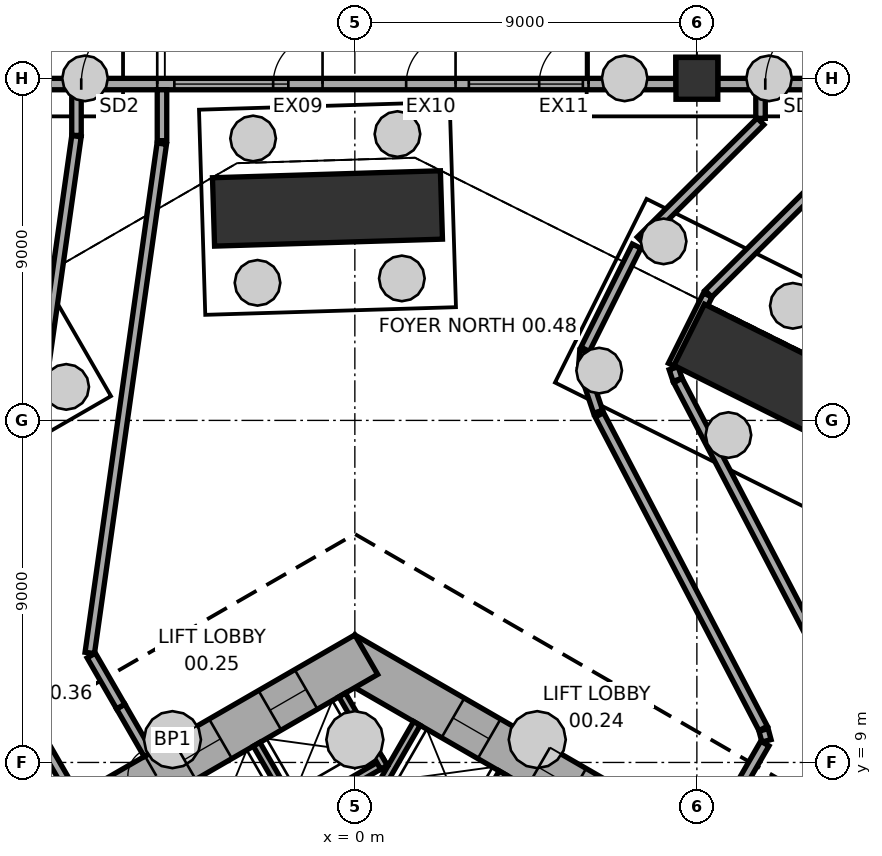
"""IFC4 building model, lengths in metres.
Left out: names, types, materials, properties, quantities, classifications, styles, units other than length and angle.
Written with IfcOpenShell. Run it as: python <this file> out.ifc"""

import sys

from ifc_helpers import new_model, si_unit, direction, frame, frame_2d, origin, origin_2d, place, context, subcontext, project, spatial, rectangle, extrude, element, fill, save


model = new_model("IFC4")
c1 = context("Model", 3, precision=1e-05, world=origin(), true_north=direction((0.0, 1.0)))
c2 = subcontext(c1, "Body", "Model", "MODEL_VIEW")
j1 = project(units=[si_unit("LENGTHUNIT", "METRE"), si_unit("PLANEANGLEUNIT", "RADIAN")], contexts=[c1])
p1 = place(None, origin())
s1 = spatial("IfcSite", under=j1, at=p1, CompositionType="ELEMENT")
p2 = place(p1, origin())
s2 = spatial("IfcBuilding", under=s1, at=p2, CompositionType="ELEMENT")
p3 = place(p2, origin())
s3 = spatial("IfcBuildingStorey", under=s2, at=p3, CompositionType="ELEMENT", Elevation=0.0)
p4 = place(p3, frame((10.677, 19.315, -0.3), z_axis=(0.0, 0.0, 1.0), x_axis=(-0.894935140363, 0.446196251154, 0.0)))
e1 = element("IfcColumn", 1, at=p4, inside=s3, PredefinedType="COLUMN", context=c2, shape_type="SweptSolid", body=[
    extrude(rectangle(XDim=4.2, YDim=1.8, at=origin_2d()), origin(), (0.0, 0.0, 1.0), 7.8),
])
p5 = place(p3, frame((-0.72, 23.577, -0.3), z_axis=(0.0, 0.0, 1.0), x_axis=(-0.999533644135, -0.030536768695, 0.0)))
e2 = element("IfcColumn", 2, at=p5, inside=s3, PredefinedType="COLUMN", context=c2, shape_type="SweptSolid", body=[
    extrude(rectangle(XDim=6.0, YDim=1.8, at=origin_2d()), origin(), (0.0, 0.0, 1.0), 7.8),
])
p6 = place(p3, frame((9.0, 27.0, -0.3), z_axis=(0.0, 0.0, 1.0), x_axis=(1.0, 0.0, 0.0)))
e3 = element("IfcColumn", 3, at=p6, inside=s3, PredefinedType="COLUMN", context=c2, shape_type="SweptSolid", body=[
    extrude(rectangle(XDim=1.1, YDim=1.1, at=origin_2d()), origin(), (0.0, 0.0, 1.0), 7.8),
])
p7 = place(p3, frame((10.4, 5.658, -0.3), z_axis=(0.0, 0.0, 1.0), x_axis=(-0.866021384402, 0.500006961711, 0.0)))
e4 = element("IfcWall", 4, at=p7, inside=s3, PredefinedType="SHEAR", context=c2, shape_type="SweptSolid", body=[
    extrude(rectangle(XDim=12.355, YDim=1.2, at=frame_2d((6.178, 0.0))), origin(), (0.0, 0.0, 1.0), 7.8),
])
p8 = place(p7, frame((2.728, 0.0, 0.3)))
e5 = element("IfcOpeningElement", 5, at=p8, cuts=e4, PredefinedType="OPENING", context=c2, shape_type="SweptSolid", body=[
    extrude(rectangle(XDim=1.1, YDim=2.1, at=frame_2d((0.55, 1.05))), frame((0.0, 0.61, 0.0), z_axis=(0.0, -1.0, 0.0), x_axis=(1.0, 0.0, 0.0)), (0.0, 0.0, 1.0), 1.22),
])
p9 = place(p7, frame((5.328, 0.0, 0.3)))
e6 = element("IfcOpeningElement", 6, at=p9, cuts=e4, PredefinedType="OPENING", context=c2, shape_type="SweptSolid", body=[
    extrude(rectangle(XDim=1.1, YDim=2.1, at=frame_2d((0.55, 1.05))), frame((0.0, 0.61, 0.0), z_axis=(0.0, -1.0, 0.0), x_axis=(1.0, 0.0, 0.0)), (0.0, 0.0, 1.0), 1.22),
])
p10 = place(p7, frame((7.928, 0.0, 0.3)))
e7 = element("IfcOpeningElement", 7, at=p10, cuts=e4, PredefinedType="OPENING", context=c2, shape_type="SweptSolid", body=[
    extrude(rectangle(XDim=1.1, YDim=2.1, at=frame_2d((0.55, 1.05))), frame((0.0, 0.61, 0.0), z_axis=(0.0, -1.0, 0.0), x_axis=(1.0, 0.0, 0.0)), (0.0, 0.0, 1.0), 1.22),
])
p11 = place(p3, frame((0.3, 11.836, -0.3), z_axis=(0.0, 0.0, 1.0), x_axis=(-0.866021384402, -0.500006961711, 0.0)))
e8 = element("IfcWall", 8, at=p11, inside=s3, PredefinedType="SHEAR", context=c2, shape_type="SweptSolid", body=[
    extrude(rectangle(XDim=12.355, YDim=1.2, at=frame_2d((6.178, 0.0))), origin(), (0.0, 0.0, 1.0), 7.8),
])
p12 = place(p11, frame((6.378, 0.0, 0.3)))
e9 = element("IfcOpeningElement", 9, at=p12, cuts=e8, PredefinedType="OPENING", context=c2, shape_type="SweptSolid", body=[
    extrude(rectangle(XDim=1.5, YDim=2.1, at=frame_2d((0.75, 1.05))), frame((0.0, 0.61, 0.0), z_axis=(0.0, -1.0, 0.0), x_axis=(1.0, 0.0, 0.0)), (0.0, 0.0, 1.0), 1.22),
])
p13 = place(p11, frame((1.828, 0.0, 0.3)))
e10 = element("IfcOpeningElement", 10, at=p13, cuts=e8, PredefinedType="OPENING", context=c2, shape_type="SweptSolid", body=[
    extrude(rectangle(XDim=1.1, YDim=2.1, at=frame_2d((0.55, 1.05))), frame((0.0, 0.61, 0.0), z_axis=(0.0, -1.0, 0.0), x_axis=(1.0, 0.0, 0.0)), (0.0, 0.0, 1.0), 1.22),
])
p14 = place(p11, frame((4.428, 0.0, 0.3)))
e11 = element("IfcOpeningElement", 11, at=p14, cuts=e8, PredefinedType="OPENING", context=c2, shape_type="SweptSolid", body=[
    extrude(rectangle(XDim=1.1, YDim=2.1, at=frame_2d((0.55, 1.05))), frame((0.0, 0.61, 0.0), z_axis=(0.0, -1.0, 0.0), x_axis=(1.0, 0.0, 0.0)), (0.0, 0.0, 1.0), 1.22),
])
p15 = place(p3, frame((26.45, 26.85, 0.0), z_axis=(0.0, 0.0, 1.0), x_axis=(-1.0, 0.0, 0.0)))
e12 = element("IfcWall", 12, at=p15, inside=s3, PredefinedType="STANDARD", context=c2, shape_type="SweptSolid", body=[
    extrude(rectangle(XDim=16.9, YDim=0.3, at=frame_2d((8.45, 0.0))), origin(), (0.0, 0.0, 1.0), 6.0),
])
p16 = place(p15, frame((2.95, 0.0, 4.7)))
e13 = element("IfcOpeningElement", 13, at=p16, cuts=e12, PredefinedType="OPENING", context=c2, shape_type="SweptSolid", body=[
    extrude(rectangle(XDim=3.0, YDim=1.3, at=frame_2d((1.5, 0.65))), frame((0.0, 0.16, 0.0), z_axis=(0.0, -1.0, 0.0), x_axis=(1.0, 0.0, 0.0)), (0.0, 0.0, 1.0), 0.32),
])
p17 = place(p15, frame((9.95, 0.0, 4.7)))
e14 = element("IfcOpeningElement", 14, at=p17, cuts=e12, PredefinedType="OPENING", context=c2, shape_type="SweptSolid", body=[
    extrude(rectangle(XDim=3.0, YDim=1.3, at=frame_2d((1.5, 0.65))), frame((0.0, 0.16, 0.0), z_axis=(0.0, -1.0, 0.0), x_axis=(1.0, 0.0, 0.0)), (0.0, 0.0, 1.0), 0.32),
])
p18 = place(p15, frame((11.0, 0.0, 0.0)))
e15 = element("IfcOpeningElement", 15, at=p18, cuts=e12, PredefinedType="OPENING", context=c2, shape_type="SweptSolid", body=[
    extrude(rectangle(XDim=2.1, YDim=2.4, at=frame_2d((1.05, 1.2))), frame((0.0, 0.16, 0.0), z_axis=(0.0, -1.0, 0.0), x_axis=(1.0, 0.0, 0.0)), (0.0, 0.0, 1.0), 0.32),
])
p19 = place(p15, frame((13.65, 0.0, 0.0)))
e16 = element("IfcOpeningElement", 16, at=p19, cuts=e12, PredefinedType="OPENING", context=c2, shape_type="SweptSolid", body=[
    extrude(rectangle(XDim=2.0, YDim=2.4, at=frame_2d((1.0, 1.2))), frame((0.0, 0.16, 0.0), z_axis=(0.0, -1.0, 0.0), x_axis=(1.0, 0.0, 0.0)), (0.0, 0.0, 1.0), 0.32),
])
p20 = place(p3, frame((8.45, 26.85, 0.0), z_axis=(0.0, 0.0, 1.0), x_axis=(-1.0, 0.0, 0.0)))
e17 = element("IfcWall", 17, at=p20, inside=s3, PredefinedType="STANDARD", context=c2, shape_type="SweptSolid", body=[
    extrude(rectangle(XDim=16.9, YDim=0.3, at=frame_2d((8.45, 0.0))), origin(), (0.0, 0.0, 1.0), 6.0),
])
p21 = place(p20, frame((2.45, 0.0, 4.7)))
e18 = element("IfcOpeningElement", 18, at=p21, cuts=e17, PredefinedType="OPENING", context=c2, shape_type="SweptSolid", body=[
    extrude(rectangle(XDim=3.0, YDim=1.3, at=frame_2d((1.5, 0.65))), frame((0.0, 0.16, 0.0), z_axis=(0.0, -1.0, 0.0), x_axis=(1.0, 0.0, 0.0)), (0.0, 0.0, 1.0), 0.32),
])
p22 = place(p20, frame((10.2, 0.0, 4.7)))
e19 = element("IfcOpeningElement", 19, at=p22, cuts=e17, PredefinedType="OPENING", context=c2, shape_type="SweptSolid", body=[
    extrude(rectangle(XDim=3.0, YDim=1.3, at=frame_2d((1.5, 0.65))), frame((0.0, 0.16, 0.0), z_axis=(0.0, -1.0, 0.0), x_axis=(1.0, 0.0, 0.0)), (0.0, 0.0, 1.0), 0.32),
])
p23 = place(p20, frame((9.3, 0.0, 0.0)))
e20 = element("IfcOpeningElement", 20, at=p23, cuts=e17, PredefinedType="OPENING", context=c2, shape_type="SweptSolid", body=[
    extrude(rectangle(XDim=1.3, YDim=2.4, at=frame_2d((0.65, 1.2))), frame((0.0, 0.16, 0.0), z_axis=(0.0, -1.0, 0.0), x_axis=(1.0, 0.0, 0.0)), (0.0, 0.0, 1.0), 0.32),
])
p24 = place(p20, frame((5.8, 0.0, 0.0)))
e21 = element("IfcOpeningElement", 21, at=p24, cuts=e17, PredefinedType="OPENING", context=c2, shape_type="SweptSolid", body=[
    extrude(rectangle(XDim=1.3, YDim=2.4, at=frame_2d((0.65, 1.2))), frame((0.0, 0.16, 0.0), z_axis=(0.0, -1.0, 0.0), x_axis=(1.0, 0.0, 0.0)), (0.0, 0.0, 1.0), 0.32),
])
p25 = place(p20, frame((2.3, 0.0, 0.0)))
e22 = element("IfcOpeningElement", 22, at=p25, cuts=e17, PredefinedType="OPENING", context=c2, shape_type="SweptSolid", body=[
    extrude(rectangle(XDim=1.3, YDim=2.4, at=frame_2d((0.65, 1.2))), frame((0.0, 0.16, 0.0), z_axis=(0.0, -1.0, 0.0), x_axis=(1.0, 0.0, 0.0)), (0.0, 0.0, 1.0), 0.32),
])
p26 = place(p20, frame((13.65, 0.0, 0.0)))
e23 = element("IfcOpeningElement", 23, at=p26, cuts=e17, PredefinedType="OPENING", context=c2, shape_type="SweptSolid", body=[
    extrude(rectangle(XDim=2.0, YDim=2.4, at=frame_2d((1.0, 1.2))), frame((0.0, 0.16, 0.0), z_axis=(0.0, -1.0, 0.0), x_axis=(1.0, 0.0, 0.0)), (0.0, 0.0, 1.0), 0.32),
])
for number, where, z_axis, x_axis in (
    (24, (2.784, 6.822, 0.0), (0.0, 0.0, 1.0), (0.5, 0.866, 0.0)),
    (25, (0.532, 8.122, 0.0), (0.0, 0.0, 1.0), (0.5, 0.866, 0.0)),
):
    element("IfcWall", number, at=place(p3, frame(where, z_axis=z_axis, x_axis=x_axis)), inside=s3, PredefinedType="PARTITIONING", context=c2, shape_type="SweptSolid", body=[
        extrude(rectangle(XDim=2.2, YDim=0.2, at=frame_2d((1.1, 0.0))), origin(), (0.0, 0.0, 1.0), 7.2),
    ])
p27 = place(p3, frame((0.803, 9.009, 0.0), z_axis=(0.0, 0.0, 1.0), x_axis=(-0.866028230842, -0.499995103361, 0.0)))
e26 = element("IfcWall", 26, at=p27, inside=s3, PredefinedType="PARTITIONING", context=c2, shape_type="SweptSolid", body=[
    extrude(rectangle(XDim=5.4, YDim=0.2, at=frame_2d((2.7, 0.0))), origin(), (0.0, 0.0, 1.0), 7.2),
])
p28 = place(p3, frame((0.767, 8.872, 0.0), z_axis=(0.0, 0.0, 1.0), x_axis=(-0.499994660107, 0.866028486751, 0.0)))
e27 = element("IfcWall", 27, at=p28, inside=s3, PredefinedType="PARTITIONING", context=c2, shape_type="SweptSolid", body=[
    extrude(rectangle(XDim=2.2, YDim=0.2, at=frame_2d((1.1, 0.0))), origin(), (0.0, 0.0, 1.0), 7.2),
])
p29 = place(p3, frame((-1.485, 7.572, 0.0), z_axis=(0.0, 0.0, 1.0), x_axis=(-0.50002983664, 0.866008176907, 0.0)))
e28 = element("IfcWall", 28, at=p29, inside=s3, PredefinedType="PARTITIONING", context=c2, shape_type="SweptSolid", body=[
    extrude(rectangle(XDim=2.2, YDim=0.2, at=frame_2d((1.1, 0.0))), origin(), (0.0, 0.0, 1.0), 7.2),
])
p30 = place(p3, frame((9.329, 6.969, 0.0), z_axis=(0.0, 0.0, 1.0), x_axis=(0.49998782916, 0.866032430508, 0.0)))
e29 = element("IfcWall", 29, at=p30, inside=s3, PredefinedType="SOLIDWALL", context=c2, shape_type="SweptSolid", body=[
    extrude(rectangle(XDim=2.92, YDim=0.25, at=frame_2d((1.46, 0.0))), origin(), (0.0, 0.0, 1.0), 7.2),
])
p31 = place(p3, frame((-7.385, 8.092, 0.0), z_axis=(0.0, 0.0, 1.0), x_axis=(-0.500011578892, 0.866018718605, 0.0)))
e30 = element("IfcWall", 30, at=p31, inside=s3, PredefinedType="SOLIDWALL", context=c2, shape_type="SweptSolid", body=[
    extrude(rectangle(XDim=3.655, YDim=0.25, at=frame_2d((1.827, 0.0))), origin(), (0.0, 0.0, 1.0), 7.2),
])
p32 = place(p3, frame((10.755, 9.856, 0.0), z_axis=(0.0, 0.0, 1.0), x_axis=(0.258174364225, -0.966098337467, 0.0)))
e31 = element("IfcWall", 31, at=p32, inside=s3, PredefinedType="SOLIDWALL", context=c2, shape_type="SweptSolid", body=[
    extrude(rectangle(XDim=0.297, YDim=0.25, at=frame_2d((0.148, 0.0))), origin(), (0.0, 0.0, 1.0), 7.2),
])
p33 = place(p3, frame((10.745, 9.895, 0.0), z_axis=(0.0, 0.0, 1.0), x_axis=(-0.463048194797, 0.886333102899, 0.0)))
e32 = element("IfcWall", 32, at=p33, inside=s3, PredefinedType="SOLIDWALL", context=c2, shape_type="SweptSolid", body=[
    extrude(rectangle(XDim=9.308, YDim=0.25, at=frame_2d((4.654, 0.0))), origin(), (0.0, 0.0, 1.0), 7.2),
])
p34 = place(p3, frame((-6.162, 10.472, 0.0), z_axis=(0.0, 0.0, 1.0), x_axis=(0.500159754115, -0.865933150054, 0.0)))
e33 = element("IfcWall", 33, at=p34, inside=s3, PredefinedType="SOLIDWALL", context=c2, shape_type="SweptSolid", body=[
    extrude(rectangle(XDim=1.45, YDim=0.25, at=frame_2d((0.725, 0.0))), origin(), (0.0, 0.0, 1.0), 7.2),
])
p35 = place(p3, frame((-6.162, 10.472, 0.0), z_axis=(0.0, 0.0, 1.0), x_axis=(-0.499899694197, 0.866083307622, 0.0)))
e34 = element("IfcWall", 34, at=p35, inside=s3, PredefinedType="SOLIDWALL", context=c2, shape_type="SweptSolid", body=[
    extrude(rectangle(XDim=1.55, YDim=0.25, at=frame_2d((0.775, 0.0))), origin(), (0.0, 0.0, 1.0), 7.2),
])
p36 = place(p3, frame((-9.278, 11.666, 0.0), z_axis=(0.0, 0.0, 1.0), x_axis=(0.140022217881, 0.990148361863, 0.0)))
e35 = element("IfcWall", 35, at=p36, inside=s3, PredefinedType="SOLIDWALL", context=c2, shape_type="SweptSolid", body=[
    extrude(rectangle(XDim=13.95, YDim=0.25, at=frame_2d((6.975, 0.0))), origin(), (0.0, 0.0, 1.0), 7.2),
])
p37 = place(p3, frame((6.4, 18.228, 0.0), z_axis=(0.0, 0.0, 1.0), x_axis=(-0.317543082995, 0.948243845454, 0.0)))
e36 = element("IfcWall", 36, at=p37, inside=s3, PredefinedType="SOLIDWALL", context=c2, shape_type="SweptSolid", body=[
    extrude(rectangle(XDim=1.225, YDim=0.25, at=frame_2d((0.612, 0.0))), origin(), (0.0, 0.0, 1.0), 7.2),
])
p38 = place(p3, frame((8.501, 19.05, 0.0), z_axis=(0.0, 0.0, 1.0), x_axis=(0.463035832023, -0.88633956149, 0.0)))
e37 = element("IfcWall", 37, at=p38, inside=s3, PredefinedType="SOLIDWALL", context=c2, shape_type="SweptSolid", body=[
    extrude(rectangle(XDim=9.34, YDim=0.25, at=frame_2d((4.67, 0.0))), origin(), (0.0, 0.0, 1.0), 7.2),
])
p39 = place(p3, frame((8.389, 19.373, 0.0), z_axis=(0.0, 0.0, 1.0), x_axis=(0.317366412838, -0.948302989557, 0.0)))
e38 = element("IfcWall", 38, at=p39, inside=s3, PredefinedType="SOLIDWALL", context=c2, shape_type="SweptSolid", body=[
    extrude(rectangle(XDim=0.322, YDim=0.25, at=frame_2d((0.161, 0.0))), origin(), (0.0, 0.0, 1.0), 7.2),
])
p40 = place(p3, frame((6.014, 19.429, 0.0), z_axis=(0.0, 0.0, 1.0), x_axis=(0.06950119921, 0.997581867973, 0.0)))
e39 = element("IfcWall", 39, at=p40, inside=s3, PredefinedType="SOLIDWALL", context=c2, shape_type="SweptSolid", body=[
    extrude(rectangle(XDim=0.407, YDim=0.25, at=frame_2d((0.204, 0.0))), origin(), (0.0, 0.0, 1.0), 7.2),
])
p41 = place(p3, frame((6.06, 19.871, 0.0), z_axis=(0.0, 0.0, 1.0), x_axis=(0.446215108919, 0.894925738021, 0.0)))
e40 = element("IfcWall", 40, at=p41, inside=s3, PredefinedType="SOLIDWALL", context=c2, shape_type="SweptSolid", body=[
    extrude(rectangle(XDim=3.033, YDim=0.25, at=frame_2d((1.516, 0.0))), origin(), (0.0, 0.0, 1.0), 7.2),
])
p42 = place(p3, frame((9.286, 21.298, 0.0), z_axis=(0.0, 0.0, 1.0), x_axis=(-0.446173207246, -0.894946629211, 0.0)))
e41 = element("IfcWall", 41, at=p42, inside=s3, PredefinedType="SOLIDWALL", context=c2, shape_type="SweptSolid", body=[
    extrude(rectangle(XDim=2.066, YDim=0.25, at=frame_2d((1.033, 0.0))), origin(), (0.0, 0.0, 1.0), 7.2),
])
p43 = place(p3, frame((7.521, 22.735, 0.0), z_axis=(0.0, 0.0, 1.0), x_axis=(0.709436783923, 0.704769075383, 0.0)))
e42 = element("IfcWall", 42, at=p43, inside=s3, PredefinedType="SOLIDWALL", context=c2, shape_type="SweptSolid", body=[
    extrude(rectangle(XDim=4.446, YDim=0.25, at=frame_2d((2.223, 0.0))), origin(), (0.0, 0.0, 1.0), 7.2),
])
p44 = place(p3, frame((12.724, 24.732, 0.0), z_axis=(0.0, 0.0, 1.0), x_axis=(-0.709356161032, -0.70485022296, 0.0)))
e43 = element("IfcWall", 43, at=p44, inside=s3, PredefinedType="SOLIDWALL", context=c2, shape_type="SweptSolid", body=[
    extrude(rectangle(XDim=4.822, YDim=0.25, at=frame_2d((2.411, 0.0))), origin(), (0.0, 0.0, 1.0), 7.2),
])
p45 = place(p3, frame((-5.081, 25.281, 0.0), z_axis=(0.0, 0.0, 1.0), x_axis=(-0.140032081435, -0.990146966954, 0.0)))
e44 = element("IfcWall", 44, at=p45, inside=s3, PredefinedType="SOLIDWALL", context=c2, shape_type="SweptSolid", body=[
    extrude(rectangle(XDim=13.533, YDim=0.25, at=frame_2d((6.766, 0.0))), origin(), (0.0, 0.0, 1.0), 7.2),
])
p46 = place(p3, frame((-7.325, 25.499, 0.0), z_axis=(0.0, 0.0, 1.0), x_axis=(0.0, 1.0, 0.0)))
e45 = element("IfcWall", 45, at=p46, inside=s3, PredefinedType="SOLIDWALL", context=c2, shape_type="SweptSolid", body=[
    extrude(rectangle(XDim=1.201, YDim=0.25, at=frame_2d((0.601, 0.0))), origin(), (0.0, 0.0, 1.0), 7.2),
])
p47 = place(p3, frame((10.675, 25.948, 0.0), z_axis=(0.0, 0.0, 1.0), x_axis=(0.0, 1.0, 0.0)))
e46 = element("IfcWall", 46, at=p47, inside=s3, PredefinedType="SOLIDWALL", context=c2, shape_type="SweptSolid", body=[
    extrude(rectangle(XDim=0.752, YDim=0.25, at=frame_2d((0.376, 0.0))), origin(), (0.0, 0.0, 1.0), 7.2),
])
p48 = place(p3, frame((-5.075, 26.7, 0.0), z_axis=(0.0, 0.0, 1.0), x_axis=(0.0, -1.0, 0.0)))
e47 = element("IfcWall", 47, at=p48, inside=s3, PredefinedType="SOLIDWALL", context=c2, shape_type="SweptSolid", body=[
    extrude(rectangle(XDim=1.339, YDim=0.25, at=frame_2d((0.67, 0.0))), origin(), (0.0, 0.0, 1.0), 7.2),
])
p49 = place(p21, origin())
e48 = element("IfcWindow", 48, at=p49, inside=s3, PartitioningType="SINGLE_PANEL", PredefinedType="WINDOW", context=c2, shape_type="SweptSolid", body=[
    extrude(rectangle(XDim=3.0, YDim=1.3, at=frame_2d((1.5, 0.65))), frame((0.0, 0.03, 0.0), z_axis=(0.0, -1.0, 0.0), x_axis=(1.0, 0.0, 0.0)), (0.0, 0.0, 1.0), 0.06),
])
fill(e18, e48)
p50 = place(p22, origin())
e49 = element("IfcWindow", 49, at=p50, inside=s3, PartitioningType="SINGLE_PANEL", PredefinedType="WINDOW", context=c2, shape_type="SweptSolid", body=[
    extrude(rectangle(XDim=3.0, YDim=1.3, at=frame_2d((1.5, 0.65))), frame((0.0, 0.03, 0.0), z_axis=(0.0, -1.0, 0.0), x_axis=(1.0, 0.0, 0.0)), (0.0, 0.0, 1.0), 0.06),
])
fill(e19, e49)
p51 = place(p12, origin())
e50 = element("IfcDoor", 50, at=p51, inside=s3, OperationType="DOUBLE_DOOR_SINGLE_SWING", PredefinedType="DOOR", context=c2, shape_type="SweptSolid", body=[
    extrude(rectangle(XDim=1.5, YDim=2.1, at=frame_2d((0.75, 1.05))), frame((0.0, 0.025, 0.0), z_axis=(0.0, -1.0, 0.0), x_axis=(1.0, 0.0, 0.0)), (0.0, 0.0, 1.0), 0.05),
])
fill(e9, e50)
p52 = place(p9, origin())
e51 = element("IfcDoor", 51, at=p52, inside=s3, OperationType="DOUBLE_DOOR_SLIDING", PredefinedType="DOOR", context=c2, shape_type="SweptSolid", body=[
    extrude(rectangle(XDim=1.1, YDim=2.1, at=frame_2d((0.55, 1.05))), frame((0.0, 0.025, 0.0), z_axis=(0.0, -1.0, 0.0), x_axis=(1.0, 0.0, 0.0)), (0.0, 0.0, 1.0), 0.05),
])
fill(e6, e51)
p53 = place(p10, origin())
e52 = element("IfcDoor", 52, at=p53, inside=s3, OperationType="DOUBLE_DOOR_SLIDING", PredefinedType="DOOR", context=c2, shape_type="SweptSolid", body=[
    extrude(rectangle(XDim=1.1, YDim=2.1, at=frame_2d((0.55, 1.05))), frame((0.0, 0.025, 0.0), z_axis=(0.0, -1.0, 0.0), x_axis=(1.0, 0.0, 0.0)), (0.0, 0.0, 1.0), 0.05),
])
fill(e7, e52)
p54 = place(p13, origin())
e53 = element("IfcDoor", 53, at=p54, inside=s3, OperationType="DOUBLE_DOOR_SLIDING", PredefinedType="DOOR", context=c2, shape_type="SweptSolid", body=[
    extrude(rectangle(XDim=1.1, YDim=2.1, at=frame_2d((0.55, 1.05))), frame((0.0, 0.025, 0.0), z_axis=(0.0, -1.0, 0.0), x_axis=(1.0, 0.0, 0.0)), (0.0, 0.0, 1.0), 0.05),
])
fill(e10, e53)
p55 = place(p14, origin())
e54 = element("IfcDoor", 54, at=p55, inside=s3, OperationType="DOUBLE_DOOR_SLIDING", PredefinedType="DOOR", context=c2, shape_type="SweptSolid", body=[
    extrude(rectangle(XDim=1.1, YDim=2.1, at=frame_2d((0.55, 1.05))), frame((0.0, 0.025, 0.0), z_axis=(0.0, -1.0, 0.0), x_axis=(1.0, 0.0, 0.0)), (0.0, 0.0, 1.0), 0.05),
])
fill(e11, e54)
p56 = place(p23, frame((1.3, 0.0, 0.0), z_axis=(0.0, 0.0, 1.0), x_axis=(-1.0, 0.0, 0.0)))
e55 = element("IfcDoor", 55, at=p56, inside=s3, OperationType="SINGLE_SWING_RIGHT", PredefinedType="DOOR", context=c2, shape_type="SweptSolid", body=[
    extrude(rectangle(XDim=1.3, YDim=2.4, at=frame_2d((0.65, 1.2))), frame((0.0, 0.025, 0.0), z_axis=(0.0, -1.0, 0.0), x_axis=(1.0, 0.0, 0.0)), (0.0, 0.0, 1.0), 0.05),
])
fill(e20, e55)
p57 = place(p24, frame((1.3, 0.0, 0.0), z_axis=(0.0, 0.0, 1.0), x_axis=(-1.0, 0.0, 0.0)))
e56 = element("IfcDoor", 56, at=p57, inside=s3, OperationType="SINGLE_SWING_RIGHT", PredefinedType="DOOR", context=c2, shape_type="SweptSolid", body=[
    extrude(rectangle(XDim=1.3, YDim=2.4, at=frame_2d((0.65, 1.2))), frame((0.0, 0.025, 0.0), z_axis=(0.0, -1.0, 0.0), x_axis=(1.0, 0.0, 0.0)), (0.0, 0.0, 1.0), 0.05),
])
fill(e21, e56)
p58 = place(p25, frame((1.3, 0.0, 0.0), z_axis=(0.0, 0.0, 1.0), x_axis=(-1.0, 0.0, 0.0)))
e57 = element("IfcDoor", 57, at=p58, inside=s3, OperationType="SINGLE_SWING_RIGHT", PredefinedType="DOOR", context=c2, shape_type="SweptSolid", body=[
    extrude(rectangle(XDim=1.3, YDim=2.4, at=frame_2d((0.65, 1.2))), frame((0.0, 0.025, 0.0), z_axis=(0.0, -1.0, 0.0), x_axis=(1.0, 0.0, 0.0)), (0.0, 0.0, 1.0), 0.05),
])
fill(e22, e57)
p59 = place(p19, frame((2.0, 0.0, 0.0), z_axis=(0.0, 0.0, 1.0), x_axis=(-1.0, 0.0, 0.0)))
e58 = element("IfcDoor", 58, at=p59, inside=s3, OperationType="DOUBLE_DOOR_SINGLE_SWING", PredefinedType="DOOR", context=c2, shape_type="SweptSolid", body=[
    extrude(rectangle(XDim=2.0, YDim=2.4, at=frame_2d((1.0, 1.2))), frame((0.0, 0.025, 0.0), z_axis=(0.0, -1.0, 0.0), x_axis=(1.0, 0.0, 0.0)), (0.0, 0.0, 1.0), 0.05),
])
fill(e16, e58)
p60 = place(p26, frame((2.0, 0.0, 0.0), z_axis=(0.0, 0.0, 1.0), x_axis=(-1.0, 0.0, 0.0)))
e59 = element("IfcDoor", 59, at=p60, inside=s3, OperationType="DOUBLE_DOOR_SINGLE_SWING", PredefinedType="DOOR", context=c2, shape_type="SweptSolid", body=[
    extrude(rectangle(XDim=2.0, YDim=2.4, at=frame_2d((1.0, 1.2))), frame((0.0, 0.025, 0.0), z_axis=(0.0, -1.0, 0.0), x_axis=(1.0, 0.0, 0.0)), (0.0, 0.0, 1.0), 0.05),
])
fill(e23, e59)
save(model, sys.argv[1])
